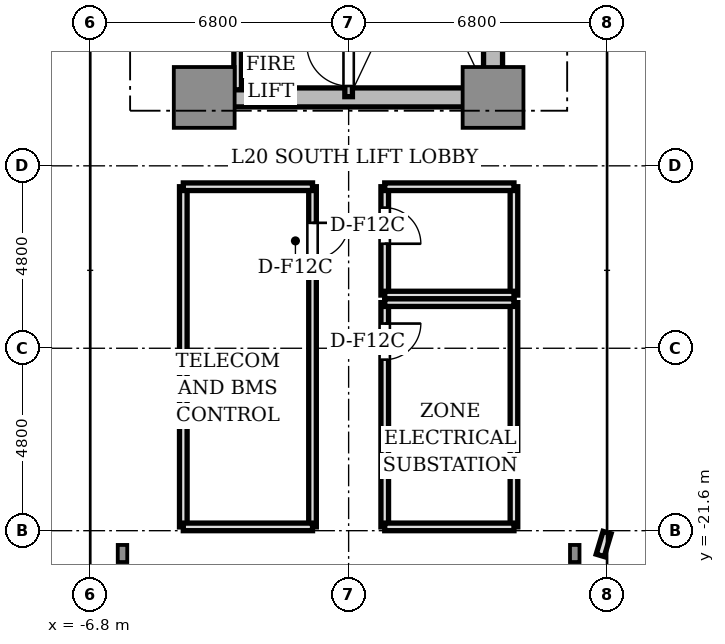
"""IFC4 building model, lengths in metres.
Left out: names, types, materials, properties, quantities, classifications, styles, units other than length and angle.
Written with IfcOpenShell. Run it as: python <this file> out.ifc"""

import sys

from ifc_helpers import new_model, si_unit, direction, frame, frame_2d, origin, origin_2d, place, context, subcontext, project, spatial, rectangle, i_section, extrude, source, transform, mapped, element, fill, save


model = new_model("IFC4")
c1 = context("Model", 3, precision=1e-05, world=origin(), true_north=direction((0.0, 1.0)))
c2 = subcontext(c1, "Body", "Model", "MODEL_VIEW")
j1 = project(units=[si_unit("LENGTHUNIT", "METRE"), si_unit("PLANEANGLEUNIT", "RADIAN")], contexts=[c1])
p1 = place(None, origin())
s1 = spatial("IfcSite", under=j1, at=p1, CompositionType="ELEMENT")
p2 = place(p1, origin())
s2 = spatial("IfcBuilding", under=s1, at=p2, CompositionType="ELEMENT")
p3 = place(p2, frame((0.0, 0.0, 74.5)))
s3 = spatial("IfcBuildingStorey", under=s2, at=p3, CompositionType="ELEMENT", Elevation=74.5)
p4 = place(p3, frame((-3.55, -10.2, 0.0), z_axis=(0.0, 0.0, 1.0), x_axis=(1.0, 0.0, 0.0)))
e1 = element("IfcWall", 1, at=p4, inside=s3, PredefinedType="SHEAR", context=c2, shape_type="SweptSolid", body=[
    extrude(rectangle(XDim=7.1, YDim=0.5, at=frame_2d((3.55, 0.0))), origin(), (0.0, 0.0, 1.0), 4.18),
])
p5 = place(p3, frame((3.8, -9.75, 0.0), z_axis=(0.0, 0.0, 1.0), x_axis=(0.0, 1.0, 0.0)))
e2 = element("IfcWall", 2, at=p5, inside=s3, PredefinedType="SHEAR", context=c2, shape_type="SweptSolid", body=[
    extrude(rectangle(XDim=6.9, YDim=0.5, at=frame_2d((3.45, 0.0))), origin(), (0.0, 0.0, 1.0), 4.18),
])
m1 = source(origin(), c2, "Body", "SweptSolid", [
    extrude(rectangle(XDim=1.6, YDim=1.6, at=origin_2d()), origin(), (0.0, 0.0, 1.0), 4.18),
])
for number, where, z_axis, x_axis in (
    (3, (-3.8, -10.2, 0.0), (0.0, 0.0, 1.0), (1.0, 0.0, 0.0)),
    (4, (3.8, -10.2, 0.0), (0.0, 0.0, 1.0), (1.0, 0.0, 0.0)),
):
    element("IfcColumn", number, at=place(p3, frame(where, z_axis=z_axis, x_axis=x_axis)), inside=s3, PredefinedType="COLUMN", context=c2, shape_type="MappedRepresentation", body=[
        mapped(m1, transform((0.0, 0.0, 0.0), scale=1.0)),
    ])
m2 = source(origin(), c2, "Body", "SweptSolid", [
    extrude(i_section(OverallWidth=0.25, OverallDepth=0.45, WebThickness=0.014, FlangeThickness=0.014, FilletRadius=0.015, at=origin_2d()), origin(), (0.0, 0.0, 1.0), 4.18),
])
for number, where, z_axis, x_axis in (
    (5, (-5.95, -22.2, 0.0), (0.0, 0.0, 1.0), (1.0, 0.0, 0.0)),
    (6, (5.95, -22.2, 0.0), (0.0, 0.0, 1.0), (1.0, 0.0, 0.0)),
):
    element("IfcColumn", number, at=place(p3, frame(where, z_axis=z_axis, x_axis=x_axis)), inside=s3, PredefinedType="COLUMN", context=c2, shape_type="MappedRepresentation", body=[
        mapped(m2, transform((0.0, 0.0, 0.0), scale=1.0)),
    ])
p6 = place(p3, frame((6.62, -22.25, 3.65), z_axis=(0.0, 0.0, 1.0), x_axis=(0.287204875193, 0.957869176696, 0.0)))
e7 = element("IfcWall", 7, at=p6, inside=s3, PredefinedType="STANDARD", context=c2, shape_type="SweptSolid", body=[
    extrude(rectangle(XDim=0.626, YDim=0.22, at=frame_2d((0.313, 0.0))), origin(), (0.0, 0.0, 1.0), 0.53),
])
p7 = place(p3, frame((0.0, -10.18, 0.0), z_axis=(0.0, 0.0, 1.0), x_axis=(0.0, 1.0, 0.0)))
e8 = element("IfcWall", 8, at=p7, inside=s3, PredefinedType="SOLIDWALL", context=c2, shape_type="SweptSolid", body=[
    extrude(rectangle(XDim=7.68, YDim=0.2, at=frame_2d((3.84, 0.0))), origin(), (0.0, 0.0, 1.0), 4.18),
])
p8 = place(p7, frame((0.28, 0.0, 0.0)))
e9 = element("IfcOpeningElement", 9, at=p8, cuts=e8, PredefinedType="OPENING", context=c2, shape_type="SweptSolid", body=[
    extrude(rectangle(XDim=1.1, YDim=2.15, at=frame_2d((0.55, 1.075))), frame((0.0, 0.11, 0.0), z_axis=(0.0, -1.0, 0.0), x_axis=(1.0, 0.0, 0.0)), (0.0, 0.0, 1.0), 0.22),
])
p9 = place(p3, frame((-2.92, -10.0, 0.0), z_axis=(0.0, 0.0, 1.0), x_axis=(0.0, 1.0, 0.0)))
e10 = element("IfcWall", 10, at=p9, inside=s3, PredefinedType="SOLIDWALL", context=c2, shape_type="SweptSolid", body=[
    extrude(rectangle(XDim=1.44, YDim=0.2, at=frame_2d((0.72, 0.0))), origin(), (0.0, 0.0, 1.0), 3.73),
])
p10 = place(p3, frame((0.95, -12.55, 0.0), z_axis=(0.0, 0.0, 1.0), x_axis=(0.0, -1.0, 0.0)))
e11 = element("IfcWall", 11, at=p10, inside=s3, PredefinedType="SOLIDWALL", context=c2, shape_type="SweptSolid", body=[
    extrude(rectangle(XDim=2.85, YDim=0.2, at=frame_2d((1.425, 0.0))), origin(), (0.0, 0.0, 1.0), 3.73),
])
p11 = place(p10, frame((0.55, 0.0, 0.0)))
e12 = element("IfcOpeningElement", 12, at=p11, cuts=e11, PredefinedType="OPENING", context=c2, shape_type="SweptSolid", body=[
    extrude(rectangle(XDim=0.95, YDim=2.15, at=frame_2d((0.475, 1.075))), frame((0.0, 0.11, 0.0), z_axis=(0.0, -1.0, 0.0), x_axis=(1.0, 0.0, 0.0)), (0.0, 0.0, 1.0), 0.22),
])
p12 = place(p3, frame((4.35, -12.55, 0.0), z_axis=(0.0, 0.0, 1.0), x_axis=(0.0, -1.0, 0.0)))
e13 = element("IfcWall", 13, at=p12, inside=s3, PredefinedType="SOLIDWALL", context=c2, shape_type="SweptSolid", body=[
    extrude(rectangle(XDim=2.85, YDim=0.2, at=frame_2d((1.425, 0.0))), origin(), (0.0, 0.0, 1.0), 2.65),
])
for number, where, z_axis, x_axis in (
    (14, (0.95, -12.55, 0.0), (0.0, 0.0, 1.0), (1.0, 0.0, 0.0)),
    (15, (0.95, -15.4, 0.0), (0.0, 0.0, 1.0), (1.0, 0.0, 0.0)),
):
    element("IfcWall", number, at=place(p3, frame(where, z_axis=z_axis, x_axis=x_axis)), inside=s3, PredefinedType="SOLIDWALL", context=c2, shape_type="SweptSolid", body=[
        extrude(rectangle(XDim=3.4, YDim=0.2, at=frame_2d((1.7, 0.0))), origin(), (0.0, 0.0, 1.0), 3.73),
    ])
p13 = place(p3, frame((0.95, -15.6, 0.0), z_axis=(0.0, 0.0, 1.0), x_axis=(0.0, -1.0, 0.0)))
e16 = element("IfcWall", 16, at=p13, inside=s3, PredefinedType="SOLIDWALL", context=c2, shape_type="SweptSolid", body=[
    extrude(rectangle(XDim=5.9, YDim=0.2, at=frame_2d((2.95, 0.0))), origin(), (0.0, 0.0, 1.0), 3.73),
])
p14 = place(p13, frame((0.55, 0.0, 0.0)))
e17 = element("IfcOpeningElement", 17, at=p14, cuts=e16, PredefinedType="OPENING", context=c2, shape_type="SweptSolid", body=[
    extrude(rectangle(XDim=0.95, YDim=2.15, at=frame_2d((0.475, 1.075))), frame((0.0, 0.11, 0.0), z_axis=(0.0, -1.0, 0.0), x_axis=(1.0, 0.0, 0.0)), (0.0, 0.0, 1.0), 0.22),
])
p15 = place(p3, frame((4.35, -15.6, 0.0), z_axis=(0.0, 0.0, 1.0), x_axis=(0.0, -1.0, 0.0)))
e18 = element("IfcWall", 18, at=p15, inside=s3, PredefinedType="SOLIDWALL", context=c2, shape_type="SweptSolid", body=[
    extrude(rectangle(XDim=5.9, YDim=0.2, at=frame_2d((2.95, 0.0))), origin(), (0.0, 0.0, 1.0), 2.65),
])
p16 = place(p3, frame((0.95, -15.6, 0.0), z_axis=(0.0, 0.0, 1.0), x_axis=(1.0, 0.0, 0.0)))
e19 = element("IfcWall", 19, at=p16, inside=s3, PredefinedType="SOLIDWALL", context=c2, shape_type="SweptSolid", body=[
    extrude(rectangle(XDim=3.4, YDim=0.2, at=frame_2d((1.7, 0.0))), origin(), (0.0, 0.0, 1.0), 3.73),
])
p17 = place(p3, frame((0.95, -21.5, 0.0), z_axis=(0.0, 0.0, 1.0), x_axis=(1.0, 0.0, 0.0)))
e20 = element("IfcWall", 20, at=p17, inside=s3, PredefinedType="SOLIDWALL", context=c2, shape_type="SweptSolid", body=[
    extrude(rectangle(XDim=3.4, YDim=0.2, at=frame_2d((1.7, 0.0))), origin(), (0.0, 0.0, 1.0), 2.65),
])
p18 = place(p3, frame((-0.95, -12.55, 0.0), z_axis=(0.0, 0.0, 1.0), x_axis=(0.0, -1.0, 0.0)))
e21 = element("IfcWall", 21, at=p18, inside=s3, PredefinedType="SOLIDWALL", context=c2, shape_type="SweptSolid", body=[
    extrude(rectangle(XDim=8.95, YDim=0.2, at=frame_2d((4.475, 0.0))), origin(), (0.0, 0.0, 1.0), 3.73),
])
p19 = place(p18, frame((0.95, 0.0, 0.0)))
e22 = element("IfcOpeningElement", 22, at=p19, cuts=e21, PredefinedType="OPENING", context=c2, shape_type="SweptSolid", body=[
    extrude(rectangle(XDim=0.95, YDim=2.15, at=frame_2d((0.475, 1.075))), frame((0.0, 0.11, 0.0), z_axis=(0.0, -1.0, 0.0), x_axis=(1.0, 0.0, 0.0)), (0.0, 0.0, 1.0), 0.22),
])
p20 = place(p3, frame((-4.35, -12.55, 0.0), z_axis=(0.0, 0.0, 1.0), x_axis=(0.0, -1.0, 0.0)))
e23 = element("IfcWall", 23, at=p20, inside=s3, PredefinedType="SOLIDWALL", context=c2, shape_type="SweptSolid", body=[
    extrude(rectangle(XDim=8.95, YDim=0.2, at=frame_2d((4.475, 0.0))), origin(), (0.0, 0.0, 1.0), 2.65),
])
p21 = place(p3, frame((-4.35, -12.55, 0.0), z_axis=(0.0, 0.0, 1.0), x_axis=(1.0, 0.0, 0.0)))
e24 = element("IfcWall", 24, at=p21, inside=s3, PredefinedType="SOLIDWALL", context=c2, shape_type="SweptSolid", body=[
    extrude(rectangle(XDim=3.4, YDim=0.2, at=frame_2d((1.7, 0.0))), origin(), (0.0, 0.0, 1.0), 3.73),
])
p22 = place(p3, frame((-4.35, -21.5, 0.0), z_axis=(0.0, 0.0, 1.0), x_axis=(1.0, 0.0, 0.0)))
e25 = element("IfcWall", 25, at=p22, inside=s3, PredefinedType="SOLIDWALL", context=c2, shape_type="SweptSolid", body=[
    extrude(rectangle(XDim=3.4, YDim=0.2, at=frame_2d((1.7, 0.0))), origin(), (0.0, 0.0, 1.0), 2.65),
])
m3 = source(origin(), c2, "Body", "SweptSolid", [
    extrude(rectangle(XDim=1.1, YDim=0.05, at=origin_2d()), origin(), (0.0, 0.0, 1.0), 2.15),
])
p23 = place(p8, frame((0.55, 0.0, 0.0)))
e26 = element("IfcDoor", 26, at=p23, inside=s3, OperationType="SINGLE_SWING_RIGHT", PredefinedType="DOOR", context=c2, shape_type="MappedRepresentation", body=[
    mapped(m3, transform((0.0, 0.0, 0.0), scale=1.0)),
])
fill(e9, e26)
m4 = source(origin(), c2, "Body", "SweptSolid", [
    extrude(rectangle(XDim=0.95, YDim=0.05, at=origin_2d()), origin(), (0.0, 0.0, 1.0), 2.15),
])
p24 = place(p11, frame((0.475, 0.0, 0.0)))
e27 = element("IfcDoor", 27, at=p24, inside=s3, OperationType="SINGLE_SWING_RIGHT", PredefinedType="DOOR", context=c2, shape_type="MappedRepresentation", body=[
    mapped(m4, transform((0.0, 0.0, 0.0), scale=1.0)),
])
fill(e12, e27)
p25 = place(p14, frame((0.475, 0.0, 0.0)))
e28 = element("IfcDoor", 28, at=p25, inside=s3, OperationType="SINGLE_SWING_LEFT", PredefinedType="DOOR", context=c2, shape_type="MappedRepresentation", body=[
    mapped(m4, transform((0.0, 0.0, 0.0), scale=1.0)),
])
fill(e17, e28)
p26 = place(p19, frame((0.475, 0.0, 0.0)))
e29 = element("IfcDoor", 29, at=p26, inside=s3, OperationType="SINGLE_SWING_LEFT", PredefinedType="DOOR", context=c2, shape_type="MappedRepresentation", body=[
    mapped(m4, transform((0.0, 0.0, 0.0), scale=1.0)),
])
fill(e22, e29)
save(model, sys.argv[1])
